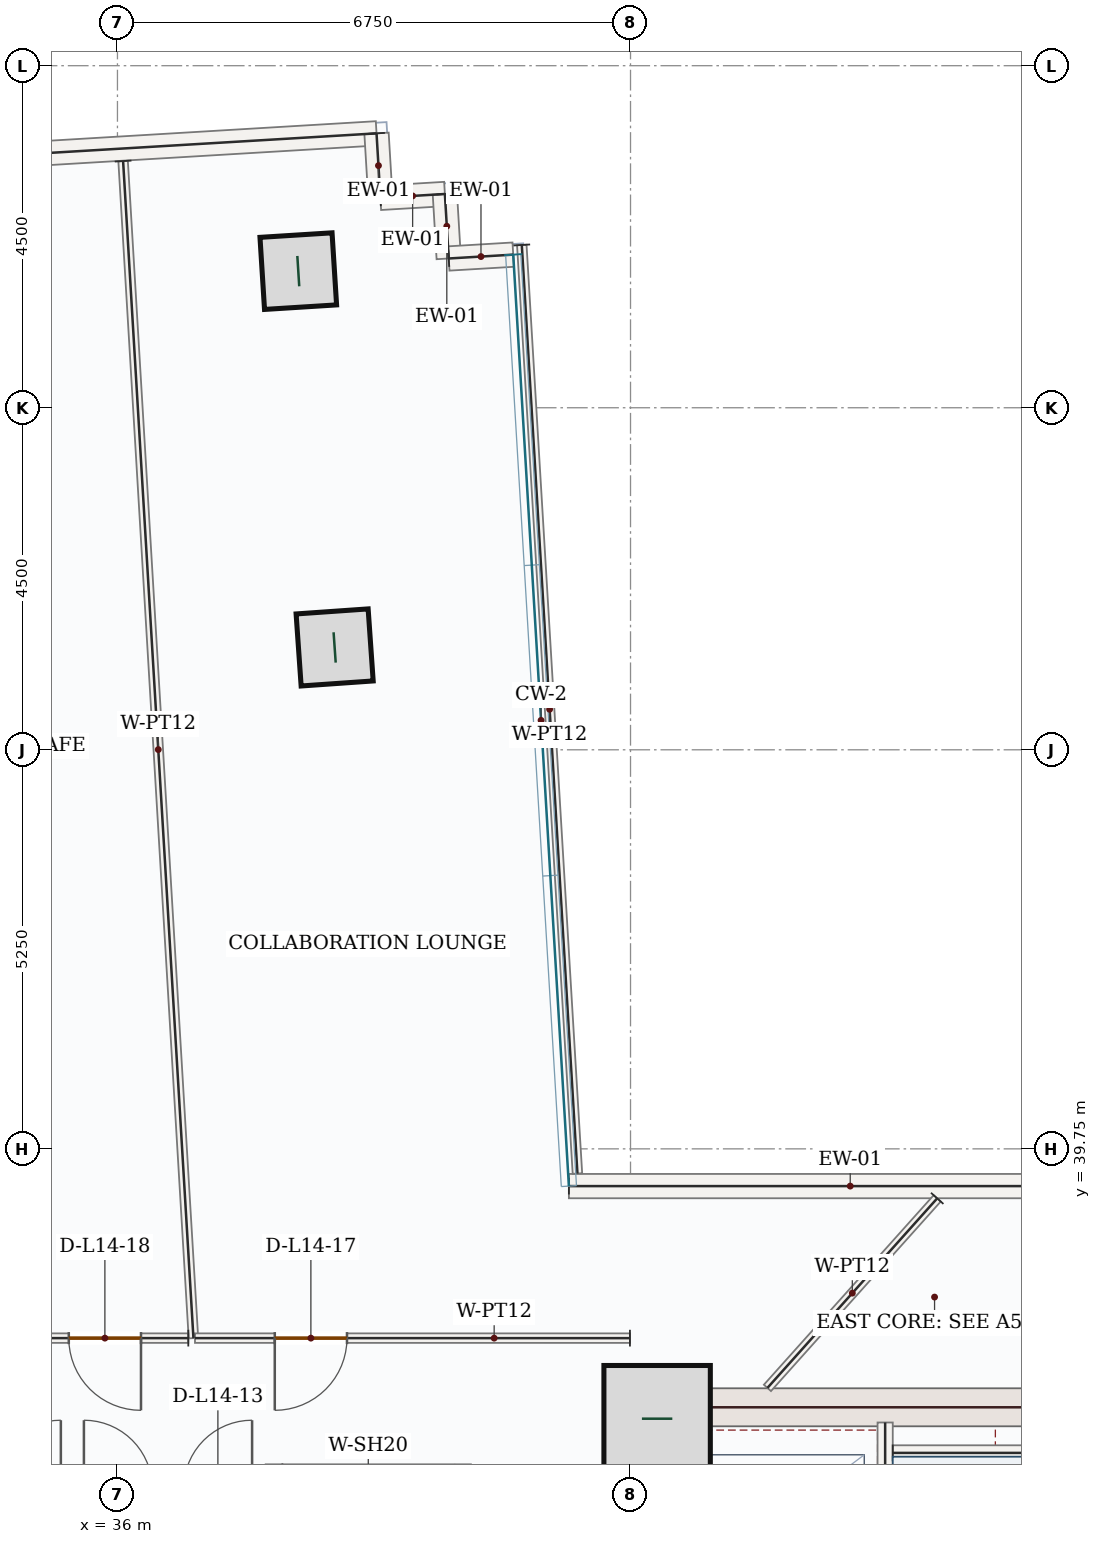
"""IFC4 building model, lengths in metres.
Left out: names, types, materials, properties, quantities, classifications, styles, units other than length and angle.
Written with IfcOpenShell. Run it as: python <this file> out.ifc"""

import sys

from ifc_helpers import new_model, si_unit, direction, frame, frame_2d, origin, origin_2d, place, context, subcontext, project, spatial, rectangle, hollow_rectangle, extrude, source, transform, mapped, element, fill, save


model = new_model("IFC4")
c1 = context("Model", 3, precision=1e-05, world=origin(), true_north=direction((0.0, 1.0)))
c2 = subcontext(c1, "Body", "Model", "MODEL_VIEW")
j1 = project(units=[si_unit("LENGTHUNIT", "METRE"), si_unit("PLANEANGLEUNIT", "RADIAN")], contexts=[c1])
p1 = place(None, origin())
s1 = spatial("IfcSite", under=j1, at=p1, CompositionType="ELEMENT")
p2 = place(p1, origin())
s2 = spatial("IfcBuilding", under=s1, at=p2, CompositionType="ELEMENT")
p3 = place(p2, frame((0.0, 0.0, 66.9)))
s3 = spatial("IfcBuildingStorey", under=s2, at=p3, CompositionType="ELEMENT", Elevation=66.9)
p4 = place(p3, frame((43.0, 28.05, 0.0), z_axis=(0.0, 0.0, 1.0), x_axis=(0.0, 1.0, 0.0)))
e1 = element("IfcWall", 1, at=p4, inside=s3, PredefinedType="SHEAR", context=c2, shape_type="SweptSolid", body=[
    extrude(rectangle(XDim=8.55, YDim=0.5, at=frame_2d((4.275, 0.0))), origin(), (0.0, 0.0, 1.0), 3.95),
])
p5 = place(p4, frame((1.5, 0.0, 0.0)))
e2 = element("IfcOpeningElement", 2, at=p5, cuts=e1, PredefinedType="OPENING", context=c2, shape_type="SweptSolid", body=[
    extrude(rectangle(XDim=1.1, YDim=2.2, at=frame_2d((0.55, 1.1))), frame((0.0, 0.26, 0.0), z_axis=(0.0, -1.0, 0.0), x_axis=(1.0, 0.0, 0.0)), (0.0, 0.0, 1.0), 0.52),
])
m1 = source(origin(), c2, "Body", "SweptSolid", [
    extrude(rectangle(XDim=7.0, YDim=0.5, at=frame_2d((3.5, 0.0))), origin(), (0.0, 0.0, 1.0), 3.95),
])
p6 = place(p3, frame((43.25, 36.35, 0.0), z_axis=(0.0, 0.0, 1.0), x_axis=(1.0, 0.0, 0.0)))
e3 = element("IfcWall", 3, at=p6, inside=s3, PredefinedType="SHEAR", context=c2, shape_type="MappedRepresentation", body=[
    mapped(m1, transform((0.0, 0.0, 0.0), x_axis=(1.0, 0.0, 0.0), y_axis=(0.0, 1.0, 0.0), z_axis=(0.0, 0.0, 1.0), scale=1.0)),
])
m2 = source(origin(), c2, "Body", "SweptSolid", [
    extrude(rectangle(XDim=1.4, YDim=1.4, at=origin_2d()), origin(), (0.0, 0.0, 1.0), 4.2),
])
p7 = place(p3, frame((43.1, 36.2, 0.0), z_axis=(0.0, 0.0, 1.0), x_axis=(1.0, 0.0, 0.0)))
e4 = element("IfcColumn", 4, at=p7, inside=s3, PredefinedType="COLUMN", context=c2, shape_type="MappedRepresentation", body=[
    mapped(m2, transform((0.0, 0.0, 0.0), x_axis=(1.0, 0.0, 0.0), y_axis=(0.0, 1.0, 0.0), z_axis=(0.0, 0.0, 1.0), scale=1.0)),
])
m3 = source(origin(), c2, "Body", "SweptSolid", [
    extrude(hollow_rectangle(XDim=0.95, YDim=0.95, WallThickness=0.05, at=origin_2d()), origin(), (0.0, 0.0, 1.0), 4.2),
])
for number, where, z_axis, x_axis in (
    (5, (38.857, 46.346, 0.0), (0.0, 0.0, 1.0), (-0.07, 0.998, 0.0)),
    (6, (38.379, 51.297, 0.0), (0.0, 0.0, 1.0), (-0.063, 0.998, 0.0)),
):
    element("IfcColumn", number, at=place(p3, frame(where, z_axis=z_axis, x_axis=x_axis)), inside=s3, PredefinedType="COLUMN", context=c2, shape_type="MappedRepresentation", body=[
        mapped(m3, transform((0.0, 0.0, 0.0), x_axis=(1.0, 0.0, 0.0), y_axis=(0.0, 1.0, 0.0), z_axis=(0.0, 0.0, 1.0), scale=1.0)),
    ])
m4 = source(origin(), c2, "Body", "SweptSolid", [
    extrude(rectangle(XDim=9.92, YDim=0.32, at=frame_2d((4.96, 0.0))), origin(), (0.0, 0.0, 1.0), 3.95),
])
p8 = place(p3, frame((29.506, 52.518, 0.0), z_axis=(0.0, 0.0, 1.0), x_axis=(0.998218942745, 0.059656871726, 0.0)))
e7 = element("IfcWall", 7, at=p8, inside=s3, PredefinedType="SOLIDWALL", context=c2, shape_type="MappedRepresentation", body=[
    mapped(m4, transform((0.0, 0.0, 0.0), x_axis=(1.0, 0.0, 0.0), y_axis=(0.0, 1.0, 0.0), z_axis=(0.0, 0.0, 1.0), scale=1.0)),
])
m5 = source(origin(), c2, "Body", "SweptSolid", [
    extrude(rectangle(XDim=0.85, YDim=0.32, at=frame_2d((0.425, 0.0))), origin(), (0.0, 0.0, 1.0), 3.95),
])
p9 = place(p3, frame((39.408, 53.11, 0.0), z_axis=(0.0, 0.0, 1.0), x_axis=(0.059732049764, -0.998214447016, 0.0)))
e8 = element("IfcWall", 8, at=p9, inside=s3, PredefinedType="SOLIDWALL", context=c2, shape_type="MappedRepresentation", body=[
    mapped(m5, transform((0.0, 0.0, 0.0), x_axis=(1.0, 0.0, 0.0), y_axis=(0.0, 1.0, 0.0), z_axis=(0.0, 0.0, 1.0), scale=1.0)),
])
m6 = source(origin(), c2, "Body", "SweptSolid", [
    extrude(rectangle(XDim=0.85, YDim=0.32, at=frame_2d((0.425, 0.0))), origin(), (0.0, 0.0, 1.0), 3.95),
])
for number, where, z_axis, x_axis in (
    (9, (39.459, 52.261, 0.0), (0.0, 0.0, 1.0), (0.998, 0.06, 0.0)),
    (10, (40.308, 52.312, 0.0), (0.0, 0.0, 1.0), (0.06, -0.998, 0.0)),
    (11, (40.358, 51.464, 0.0), (0.0, 0.0, 1.0), (0.998, 0.06, 0.0)),
):
    element("IfcWall", number, at=place(p3, frame(where, z_axis=z_axis, x_axis=x_axis)), inside=s3, PredefinedType="SOLIDWALL", context=c2, shape_type="MappedRepresentation", body=[
        mapped(m6, transform((0.0, 0.0, 0.0), x_axis=(1.0, 0.0, 0.0), y_axis=(0.0, 1.0, 0.0), z_axis=(0.0, 0.0, 1.0), scale=1.0)),
    ])
m7 = source(origin(), c2, "Body", "SweptSolid", [
    extrude(rectangle(XDim=7.403, YDim=0.32, at=frame_2d((3.701, 0.0))), origin(), (0.0, 0.0, 1.0), 3.95),
])
p10 = place(p3, frame((41.939, 39.26, 0.0), z_axis=(0.0, 0.0, 1.0), x_axis=(1.0, 0.0, 0.0)))
e12 = element("IfcWall", 12, at=p10, inside=s3, PredefinedType="SOLIDWALL", context=c2, shape_type="MappedRepresentation", body=[
    mapped(m7, transform((0.0, 0.0, 0.0), x_axis=(1.0, 0.0, 0.0), y_axis=(0.0, 1.0, 0.0), z_axis=(0.0, 0.0, 1.0), scale=1.0)),
])
p11 = place(p3, frame((46.1, 28.15, 0.0), z_axis=(0.0, 0.0, 1.0), x_axis=(0.0, 1.0, 0.0)))
e13 = element("IfcWall", 13, at=p11, inside=s3, PredefinedType="SOLIDWALL", context=c2, shape_type="SweptSolid", body=[
    extrude(rectangle(XDim=8.0, YDim=0.2, at=frame_2d((4.0, 0.0))), origin(), (0.0, 0.0, 1.0), 3.95),
])
p12 = place(p11, frame((0.4, 0.0, 0.0)))
e14 = element("IfcOpeningElement", 14, at=p12, cuts=e13, PredefinedType="OPENING", context=c2, shape_type="SweptSolid", body=[
    extrude(rectangle(XDim=1.05, YDim=2.15, at=frame_2d((0.525, 1.075))), frame((0.0, 0.11, 0.0), z_axis=(0.0, -1.0, 0.0), x_axis=(1.0, 0.0, 0.0)), (0.0, 0.0, 1.0), 0.22),
])
m8 = source(origin(), c2, "Body", "SweptSolid", [
    extrude(rectangle(XDim=3.25, YDim=0.2, at=frame_2d((1.625, 0.0))), origin(), (0.0, 0.0, 1.0), 3.95),
])
p13 = place(p3, frame((46.2, 35.75, 0.0), z_axis=(0.0, 0.0, 1.0), x_axis=(1.0, 0.0, 0.0)))
e15 = element("IfcWall", 15, at=p13, inside=s3, PredefinedType="SOLIDWALL", context=c2, shape_type="MappedRepresentation", body=[
    mapped(m8, transform((0.0, 0.0, 0.0), x_axis=(1.0, 0.0, 0.0), y_axis=(0.0, 1.0, 0.0), z_axis=(0.0, 0.0, 1.0), scale=1.0)),
])
m9 = source(origin(), c2, "Body", "SweptSolid", [
    extrude(rectangle(XDim=2.4, YDim=0.2, at=frame_2d((1.2, 0.0))), origin(), (0.0, 0.0, 1.0), 3.95),
])
for number, where, z_axis, x_axis in (
    (16, (38.05, 33.2, 0.0), (0.0, 0.0, 1.0), (0.0, 1.0, 0.0)),
    (17, (40.55, 33.2, 0.0), (0.0, 0.0, 1.0), (0.0, 1.0, 0.0)),
):
    element("IfcWall", number, at=place(p3, frame(where, z_axis=z_axis, x_axis=x_axis)), inside=s3, PredefinedType="SOLIDWALL", context=c2, shape_type="MappedRepresentation", body=[
        mapped(m9, transform((0.0, 0.0, 0.0), x_axis=(1.0, 0.0, 0.0), y_axis=(0.0, 1.0, 0.0), z_axis=(0.0, 0.0, 1.0), scale=1.0)),
    ])
m10 = source(origin(), c2, "Body", "SweptSolid", [
    extrude(rectangle(XDim=15.513, YDim=0.125, at=frame_2d((7.756, 0.0))), origin(), (0.0, 0.0, 1.0), 3.95),
])
p14 = place(p3, frame((36.074, 52.745, 0.0), z_axis=(0.0, 0.0, 1.0), x_axis=(0.059662086624, -0.998218631072, 0.0)))
e18 = element("IfcWall", 18, at=p14, inside=s3, PredefinedType="PARTITIONING", context=c2, shape_type="MappedRepresentation", body=[
    mapped(m10, transform((0.0, 0.0, 0.0), x_axis=(1.0, 0.0, 0.0), y_axis=(0.0, 1.0, 0.0), z_axis=(0.0, 0.0, 1.0), scale=1.0)),
])
p15 = place(p3, frame((36.932, 37.26, 0.0), z_axis=(0.0, 0.0, 1.0), x_axis=(-1.0, 0.0, 0.0)))
e19 = element("IfcWall", 19, at=p15, inside=s3, PredefinedType="PARTITIONING", context=c2, shape_type="SweptSolid", body=[
    extrude(rectangle(XDim=3.779, YDim=0.125, at=frame_2d((1.89, 0.0))), origin(), (0.0, 0.0, 1.0), 3.95),
])
p16 = place(p15, frame((0.622, 0.0, 0.0)))
e20 = element("IfcOpeningElement", 20, at=p16, cuts=e19, PredefinedType="OPENING", context=c2, shape_type="SweptSolid", body=[
    extrude(rectangle(XDim=0.95, YDim=2.15, at=frame_2d((0.475, 1.075))), frame((0.0, 0.073, 0.0), z_axis=(0.0, -1.0, 0.0), x_axis=(1.0, 0.0, 0.0)), (0.0, 0.0, 1.0), 0.145),
])
p17 = place(p3, frame((42.742, 37.26, 0.0), z_axis=(0.0, 0.0, 1.0), x_axis=(-0.99999999909, 4.2662116e-05, 0.0)))
e21 = element("IfcWall", 21, at=p17, inside=s3, PredefinedType="PARTITIONING", context=c2, shape_type="SweptSolid", body=[
    extrude(rectangle(XDim=5.723, YDim=0.125, at=frame_2d((2.861, 0.0))), origin(), (0.0, 0.0, 1.0), 3.95),
])
p18 = place(p17, frame((3.723, 0.0, 0.0)))
e22 = element("IfcOpeningElement", 22, at=p18, cuts=e21, PredefinedType="OPENING", context=c2, shape_type="SweptSolid", body=[
    extrude(rectangle(XDim=0.95, YDim=2.15, at=frame_2d((0.475, 1.075))), frame((0.0, 0.073, 0.0), z_axis=(0.0, -1.0, 0.0), x_axis=(1.0, 0.0, 0.0)), (0.0, 0.0, 1.0), 0.145),
])
m11 = source(origin(), c2, "Body", "SweptSolid", [
    extrude(rectangle(XDim=12.238, YDim=0.125, at=frame_2d((6.119, 0.0))), origin(), (0.0, 0.0, 1.0), 3.95),
])
p19 = place(p3, frame((41.32, 51.641, 0.0), z_axis=(0.0, 0.0, 1.0), x_axis=(0.059807214901, -0.998209946377, 0.0)))
e23 = element("IfcWall", 23, at=p19, inside=s3, PredefinedType="PARTITIONING", context=c2, shape_type="MappedRepresentation", body=[
    mapped(m11, transform((0.0, 0.0, 0.0), x_axis=(1.0, 0.0, 0.0), y_axis=(0.0, 1.0, 0.0), z_axis=(0.0, 0.0, 1.0), scale=1.0)),
])
m12 = source(origin(), c2, "Body", "SweptSolid", [
    extrude(rectangle(XDim=3.348, YDim=0.125, at=frame_2d((1.674, 0.0))), origin(), (0.0, 0.0, 1.0), 3.95),
])
p20 = place(p3, frame((46.785, 39.099, 0.0), z_axis=(0.0, 0.0, 1.0), x_axis=(-0.667206176518, -0.74487308853, 0.0)))
e24 = element("IfcWall", 24, at=p20, inside=s3, PredefinedType="PARTITIONING", context=c2, shape_type="MappedRepresentation", body=[
    mapped(m12, transform((0.0, 0.0, 0.0), x_axis=(1.0, 0.0, 0.0), y_axis=(0.0, 1.0, 0.0), z_axis=(0.0, 0.0, 1.0), scale=1.0)),
])
m13 = source(origin(), c2, "Body", "SweptSolid", [
    extrude(rectangle(XDim=0.95, YDim=2.15, at=frame_2d((0.475, 1.075))), frame((0.0, 0.025, 0.0), z_axis=(0.0, -1.0, 0.0), x_axis=(1.0, 0.0, 0.0)), (0.0, 0.0, 1.0), 0.05),
])
p21 = place(p18, origin())
e25 = element("IfcDoor", 25, at=p21, inside=s3, OperationType="SINGLE_SWING_RIGHT", PredefinedType="DOOR", context=c2, shape_type="MappedRepresentation", body=[
    mapped(m13, transform((0.0, 0.0, 0.0), x_axis=(1.0, 0.0, 0.0), y_axis=(0.0, 1.0, 0.0), z_axis=(0.0, 0.0, 1.0), scale=1.0)),
])
fill(e22, e25)
p22 = place(p16, origin())
e26 = element("IfcDoor", 26, at=p22, inside=s3, OperationType="SINGLE_SWING_LEFT", PredefinedType="DOOR", context=c2, shape_type="MappedRepresentation", body=[
    mapped(m13, transform((0.0, 0.0, 0.0), x_axis=(1.0, 0.0, 0.0), y_axis=(0.0, 1.0, 0.0), z_axis=(0.0, 0.0, 1.0), scale=1.0)),
])
fill(e20, e26)
save(model, sys.argv[1])
